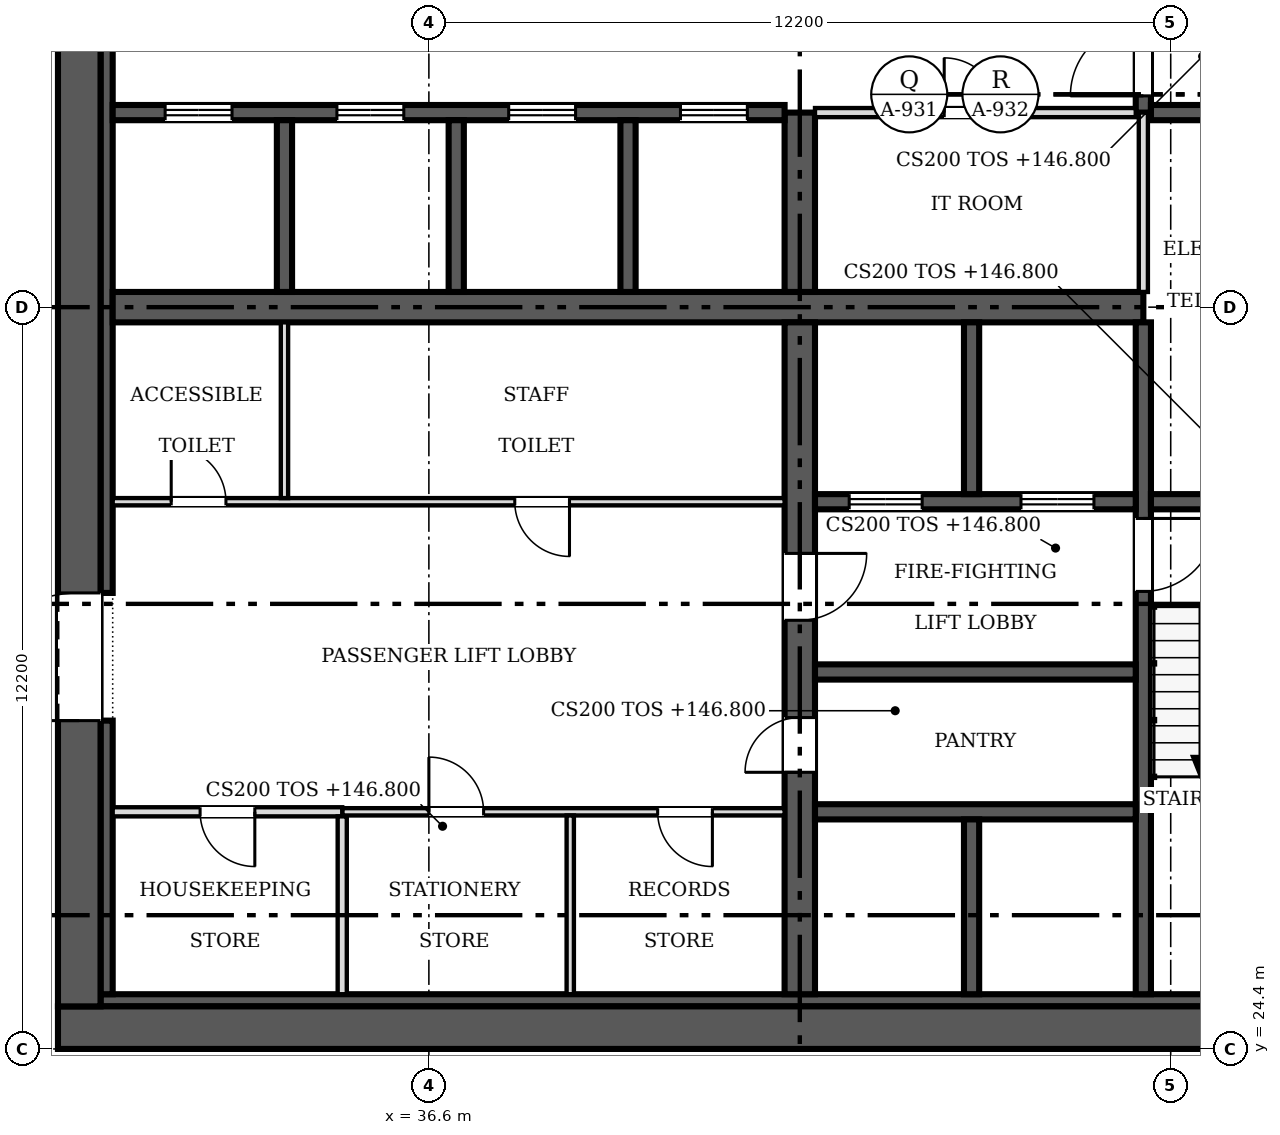
"""IFC4 building model, lengths in metres.
Left out: names, types, materials, properties, quantities, classifications, styles, units other than length and angle.
Written with IfcOpenShell. Run it as: python <this file> out.ifc"""

import sys

from ifc_helpers import new_model, si_unit, direction, frame, frame_2d, origin, place, context, subcontext, project, spatial, rectangle, extrude, source, transform, mapped, element, fill, save


model = new_model("IFC4")
c1 = context("Model", 3, precision=1e-05, world=origin(), true_north=direction((0.0, 1.0)))
c2 = subcontext(c1, "Body", "Model", "MODEL_VIEW")
j1 = project(units=[si_unit("LENGTHUNIT", "METRE"), si_unit("PLANEANGLEUNIT", "RADIAN")], contexts=[c1])
p1 = place(None, origin())
s1 = spatial("IfcSite", under=j1, at=p1, CompositionType="ELEMENT")
p2 = place(p1, origin())
s2 = spatial("IfcBuilding", under=s1, at=p2, CompositionType="ELEMENT")
p3 = place(p2, frame((0.0, 0.0, 146.8)))
s3 = spatial("IfcBuildingStorey", under=s2, at=p3, CompositionType="ELEMENT", Elevation=146.8)
p4 = place(p3, frame((54.9, 24.75, 0.0), z_axis=(0.0, 0.0, 1.0), x_axis=(-1.0, 0.0, 0.0)))
e1 = element("IfcWall", 1, at=p4, inside=s3, PredefinedType="SHEAR", context=c2, shape_type="SweptSolid", body=[
    extrude(rectangle(XDim=24.4, YDim=0.7, at=frame_2d((12.2, 0.0))), origin(), (0.0, 0.0, 1.0), 3.8),
])
m1 = source(origin(), c2, "Body", "SweptSolid", [
    extrude(rectangle(XDim=1.2, YDim=2.1, at=frame_2d((0.6, 1.05))), frame((0.0, 0.36, 0.0), z_axis=(0.0, -1.0, 0.0), x_axis=(1.0, 0.0, 0.0)), (0.0, 0.0, 1.0), 0.72),
])
p5 = place(p4, frame((1.5, 0.0, 0.0)))
e2 = element("IfcOpeningElement", 2, at=p5, cuts=e1, PredefinedType="OPENING", context=c2, shape_type="MappedRepresentation", body=[
    mapped(m1, transform((0.0, 0.0, 0.0), scale=1.0)),
])
p6 = place(p3, frame((30.85, 25.1, 0.0), z_axis=(0.0, 0.0, 1.0), x_axis=(0.0, 1.0, 0.0)))
e3 = element("IfcWall", 3, at=p6, inside=s3, PredefinedType="SHEAR", context=c2, shape_type="SweptSolid", body=[
    extrude(rectangle(XDim=23.0, YDim=0.7, at=frame_2d((11.5, 0.0))), origin(), (0.0, 0.0, 1.0), 3.8),
])
m2 = source(origin(), c2, "Body", "SweptSolid", [
    extrude(rectangle(XDim=2.1, YDim=2.4, at=frame_2d((1.05, 1.2))), frame((0.0, 0.36, 0.0), z_axis=(0.0, -1.0, 0.0), x_axis=(1.0, 0.0, 0.0)), (0.0, 0.0, 1.0), 0.72),
])
p7 = place(p6, frame((4.7, 0.0, 0.0)))
e4 = element("IfcOpeningElement", 4, at=p7, cuts=e3, PredefinedType="OPENING", context=c2, shape_type="MappedRepresentation", body=[
    mapped(m2, transform((0.0, 0.0, 0.0), scale=1.0)),
])
p8 = place(p6, frame((16.2, 0.0, 0.0)))
e5 = element("IfcOpeningElement", 5, at=p8, cuts=e3, PredefinedType="OPENING", context=c2, shape_type="MappedRepresentation", body=[
    mapped(m2, transform((0.0, 0.0, 0.0), scale=1.0)),
])
p9 = place(p3, frame((31.2, 25.2, 0.0), z_axis=(0.0, 0.0, 1.0), x_axis=(1.0, 0.0, 0.0)))
e6 = element("IfcWall", 6, at=p9, inside=s3, PredefinedType="SOLIDWALL", context=c2, shape_type="SweptSolid", body=[
    extrude(rectangle(XDim=21.0, YDim=0.2, at=frame_2d((10.5, 0.0))), origin(), (0.0, 0.0, 1.0), 3.8),
])
p10 = place(p3, frame((31.3, 25.3, 0.0), z_axis=(0.0, 0.0, 1.0), x_axis=(0.0, 1.0, 0.0)))
e7 = element("IfcWall", 7, at=p10, inside=s3, PredefinedType="SOLIDWALL", context=c2, shape_type="SweptSolid", body=[
    extrude(rectangle(XDim=4.5, YDim=0.2, at=frame_2d((2.25, 0.0))), origin(), (0.0, 0.0, 1.0), 3.8),
])
p11 = place(p3, frame((31.3, 31.9, 0.0), z_axis=(0.0, 0.0, 1.0), x_axis=(0.0, 1.0, 0.0)))
e8 = element("IfcWall", 8, at=p11, inside=s3, PredefinedType="SOLIDWALL", context=c2, shape_type="SweptSolid", body=[
    extrude(rectangle(XDim=9.4, YDim=0.2, at=frame_2d((4.7, 0.0))), origin(), (0.0, 0.0, 1.0), 3.8),
])
p12 = place(p3, frame((31.4, 36.6, 0.0), z_axis=(0.0, 0.0, 1.0), x_axis=(1.0, 0.0, 0.0)))
e9 = element("IfcWall", 9, at=p12, inside=s3, PredefinedType="SHEAR", context=c2, shape_type="SweptSolid", body=[
    extrude(rectangle(XDim=16.95, YDim=0.5, at=frame_2d((8.475, 0.0))), origin(), (0.0, 0.0, 1.0), 3.8),
])
p13 = place(p3, frame((42.7, 36.35, 0.0), z_axis=(0.0, 0.0, 1.0), x_axis=(0.0, -1.0, 0.0)))
e10 = element("IfcWall", 10, at=p13, inside=s3, PredefinedType="SHEAR", context=c2, shape_type="SweptSolid", body=[
    extrude(rectangle(XDim=11.05, YDim=0.5, at=frame_2d((5.525, 0.0))), origin(), (0.0, 0.0, 1.0), 3.8),
])
m3 = source(origin(), c2, "Body", "SweptSolid", [
    extrude(rectangle(XDim=0.9, YDim=2.1, at=frame_2d((0.45, 1.05))), frame((0.0, 0.26, 0.0), z_axis=(0.0, -1.0, 0.0), x_axis=(1.0, 0.0, 0.0)), (0.0, 0.0, 1.0), 0.52),
])
p14 = place(p13, frame((6.5, 0.0, 0.0)))
e11 = element("IfcOpeningElement", 11, at=p14, cuts=e10, PredefinedType="OPENING", context=c2, shape_type="MappedRepresentation", body=[
    mapped(m3, transform((0.0, 0.0, 0.0), scale=1.0)),
])
m4 = source(origin(), c2, "Body", "SweptSolid", [
    extrude(rectangle(XDim=1.1, YDim=2.1, at=frame_2d((0.55, 1.05))), frame((0.0, 0.26, 0.0), z_axis=(0.0, -1.0, 0.0), x_axis=(1.0, 0.0, 0.0)), (0.0, 0.0, 1.0), 0.52),
])
p15 = place(p13, frame((3.8, 0.0, 0.0)))
e12 = element("IfcOpeningElement", 12, at=p15, cuts=e10, PredefinedType="OPENING", context=c2, shape_type="MappedRepresentation", body=[
    mapped(m4, transform((0.0, 0.0, 0.0), scale=1.0)),
])
p16 = place(p3, frame((42.7, 36.85, 0.0), z_axis=(0.0, 0.0, 1.0), x_axis=(0.0, 1.0, 0.0)))
e13 = element("IfcWall", 13, at=p16, inside=s3, PredefinedType="SHEAR", context=c2, shape_type="SweptSolid", body=[
    extrude(rectangle(XDim=2.95, YDim=0.5, at=frame_2d((1.475, 0.0))), origin(), (0.0, 0.0, 1.0), 3.8),
])
p17 = place(p3, frame((31.4, 39.8, 0.0), z_axis=(0.0, 0.0, 1.0), x_axis=(1.0, 0.0, 0.0)))
e14 = element("IfcWall", 14, at=p17, inside=s3, PredefinedType="SOLIDWALL", context=c2, shape_type="SweptSolid", body=[
    extrude(rectangle(XDim=11.05, YDim=0.25, at=frame_2d((5.525, 0.0))), origin(), (0.0, 0.0, 1.0), 3.8),
])
m5 = source(origin(), c2, "Body", "SweptSolid", [
    extrude(rectangle(XDim=1.1, YDim=2.1, at=frame_2d((0.55, 1.05))), frame((0.0, 0.135, 0.0), z_axis=(0.0, -1.0, 0.0), x_axis=(1.0, 0.0, 0.0)), (0.0, 0.0, 1.0), 0.27),
])
p18 = place(p17, frame((0.863, 0.0, 0.0)))
e15 = element("IfcOpeningElement", 15, at=p18, cuts=e14, PredefinedType="OPENING", context=c2, shape_type="MappedRepresentation", body=[
    mapped(m5, transform((0.0, 0.0, 0.0), scale=1.0)),
])
p19 = place(p17, frame((3.688, 0.0, 0.0)))
e16 = element("IfcOpeningElement", 16, at=p19, cuts=e14, PredefinedType="OPENING", context=c2, shape_type="MappedRepresentation", body=[
    mapped(m5, transform((0.0, 0.0, 0.0), scale=1.0)),
])
p20 = place(p17, frame((6.512, 0.0, 0.0)))
e17 = element("IfcOpeningElement", 17, at=p20, cuts=e14, PredefinedType="OPENING", context=c2, shape_type="MappedRepresentation", body=[
    mapped(m5, transform((0.0, 0.0, 0.0), scale=1.0)),
])
p21 = place(p17, frame((9.337, 0.0, 0.0)))
e18 = element("IfcOpeningElement", 18, at=p21, cuts=e14, PredefinedType="OPENING", context=c2, shape_type="MappedRepresentation", body=[
    mapped(m5, transform((0.0, 0.0, 0.0), scale=1.0)),
])
p22 = place(p3, frame((48.35, 36.35, 0.0), z_axis=(0.0, 0.0, 1.0), x_axis=(0.0, -1.0, 0.0)))
e19 = element("IfcWall", 19, at=p22, inside=s3, PredefinedType="SOLIDWALL", context=c2, shape_type="SweptSolid", body=[
    extrude(rectangle(XDim=11.05, YDim=0.25, at=frame_2d((5.525, 0.0))), origin(), (0.0, 0.0, 1.0), 3.8),
])
m6 = source(origin(), c2, "Body", "SweptSolid", [
    extrude(rectangle(XDim=1.2, YDim=2.1, at=frame_2d((0.6, 1.05))), frame((0.0, 0.135, 0.0), z_axis=(0.0, -1.0, 0.0), x_axis=(1.0, 0.0, 0.0)), (0.0, 0.0, 1.0), 0.27),
])
p23 = place(p22, frame((3.225, 0.0, 0.0)))
e20 = element("IfcOpeningElement", 20, at=p23, cuts=e19, PredefinedType="OPENING", context=c2, shape_type="MappedRepresentation", body=[
    mapped(m6, transform((0.0, 0.0, 0.0), scale=1.0)),
])
p24 = place(p3, frame((48.225, 33.4, 0.0), z_axis=(0.0, 0.0, 1.0), x_axis=(-1.0, 0.0, 0.0)))
e21 = element("IfcWall", 21, at=p24, inside=s3, PredefinedType="SOLIDWALL", context=c2, shape_type="SweptSolid", body=[
    extrude(rectangle(XDim=5.275, YDim=0.25, at=frame_2d((2.638, 0.0))), origin(), (0.0, 0.0, 1.0), 3.8),
])
p25 = place(p24, frame((3.512, 0.0, 0.0)))
e22 = element("IfcOpeningElement", 22, at=p25, cuts=e21, PredefinedType="OPENING", context=c2, shape_type="MappedRepresentation", body=[
    mapped(m6, transform((0.0, 0.0, 0.0), scale=1.0)),
])
p26 = place(p24, frame((0.688, 0.0, 0.0)))
e23 = element("IfcOpeningElement", 23, at=p26, cuts=e21, PredefinedType="OPENING", context=c2, shape_type="MappedRepresentation", body=[
    mapped(m6, transform((0.0, 0.0, 0.0), scale=1.0)),
])
p27 = place(p3, frame((48.475, 33.4, 0.0), z_axis=(0.0, 0.0, 1.0), x_axis=(1.0, 0.0, 0.0)))
e24 = element("IfcWall", 24, at=p27, inside=s3, PredefinedType="SOLIDWALL", context=c2, shape_type="SweptSolid", body=[
    extrude(rectangle(XDim=3.525, YDim=0.25, at=frame_2d((1.762, 0.0))), origin(), (0.0, 0.0, 1.0), 3.8),
])
p28 = place(p3, frame((48.35, 47.9, 0.0), z_axis=(0.0, 0.0, 1.0), x_axis=(0.0, -1.0, 0.0)))
e25 = element("IfcWall", 25, at=p28, inside=s3, PredefinedType="SOLIDWALL", context=c2, shape_type="SweptSolid", body=[
    extrude(rectangle(XDim=8.1, YDim=0.25, at=frame_2d((4.05, 0.0))), origin(), (0.0, 0.0, 1.0), 3.8),
])
p29 = place(p28, frame((6.625, 0.0, 0.0)))
e26 = element("IfcOpeningElement", 26, at=p29, cuts=e25, PredefinedType="OPENING", context=c2, shape_type="MappedRepresentation", body=[
    mapped(m6, transform((0.0, 0.0, 0.0), scale=1.0)),
])
for number, where, z_axis, x_axis in (
    (27, (42.95, 28.3, 0.0), (0.0, 0.0, 1.0), (1.0, 0.0, 0.0)),
    (28, (42.95, 30.6, 0.0), (0.0, 0.0, 1.0), (1.0, 0.0, 0.0)),
):
    element("IfcWall", number, at=place(p3, frame(where, z_axis=z_axis, x_axis=x_axis)), inside=s3, PredefinedType="SOLIDWALL", context=c2, shape_type="SweptSolid", body=[
        extrude(rectangle(XDim=5.275, YDim=0.25, at=frame_2d((2.638, 0.0))), origin(), (0.0, 0.0, 1.0), 3.8),
    ])
p30 = place(p3, frame((48.475, 39.8, 0.0), z_axis=(0.0, 0.0, 1.0), x_axis=(1.0, 0.0, 0.0)))
e29 = element("IfcWall", 29, at=p30, inside=s3, PredefinedType="SOLIDWALL", context=c2, shape_type="SweptSolid", body=[
    extrude(rectangle(XDim=3.4, YDim=0.25, at=frame_2d((1.7, 0.0))), origin(), (0.0, 0.0, 1.0), 3.8),
])
for number, where, z_axis, x_axis in (
    (30, (34.225, 36.85, 0.0), (0.0, 0.0, 1.0), (0.0, 1.0, 0.0)),
    (31, (37.05, 36.85, 0.0), (0.0, 0.0, 1.0), (0.0, 1.0, 0.0)),
    (32, (39.875, 36.85, 0.0), (0.0, 0.0, 1.0), (0.0, 1.0, 0.0)),
):
    element("IfcWall", number, at=place(p3, frame(where, z_axis=z_axis, x_axis=x_axis)), inside=s3, PredefinedType="SOLIDWALL", context=c2, shape_type="SweptSolid", body=[
        extrude(rectangle(XDim=2.825, YDim=0.25, at=frame_2d((1.413, 0.0))), origin(), (0.0, 0.0, 1.0), 3.8),
    ])
p31 = place(p3, frame((45.525, 33.525, 0.0), z_axis=(0.0, 0.0, 1.0), x_axis=(0.0, 1.0, 0.0)))
e33 = element("IfcWall", 33, at=p31, inside=s3, PredefinedType="SOLIDWALL", context=c2, shape_type="SweptSolid", body=[
    extrude(rectangle(XDim=2.825, YDim=0.25, at=frame_2d((1.413, 0.0))), origin(), (0.0, 0.0, 1.0), 3.8),
])
p32 = place(p3, frame((45.525, 25.3, 0.0), z_axis=(0.0, 0.0, 1.0), x_axis=(0.0, 1.0, 0.0)))
e34 = element("IfcWall", 34, at=p32, inside=s3, PredefinedType="SOLIDWALL", context=c2, shape_type="SweptSolid", body=[
    extrude(rectangle(XDim=2.875, YDim=0.25, at=frame_2d((1.438, 0.0))), origin(), (0.0, 0.0, 1.0), 3.8),
])
p33 = place(p3, frame((31.4, 33.4, 0.0), z_axis=(0.0, 0.0, 1.0), x_axis=(1.0, 0.0, 0.0)))
e35 = element("IfcWall", 35, at=p33, inside=s3, PredefinedType="PARTITIONING", context=c2, shape_type="SweptSolid", body=[
    extrude(rectangle(XDim=11.05, YDim=0.12, at=frame_2d((5.525, 0.0))), origin(), (0.0, 0.0, 1.0), 3.5),
])
m7 = source(origin(), c2, "Body", "SweptSolid", [
    extrude(rectangle(XDim=0.9, YDim=2.1, at=frame_2d((0.45, 1.05))), frame((0.0, 0.07, 0.0), z_axis=(0.0, -1.0, 0.0), x_axis=(1.0, 0.0, 0.0)), (0.0, 0.0, 1.0), 0.14),
])
p34 = place(p33, frame((0.962, 0.0, 0.0)))
e36 = element("IfcOpeningElement", 36, at=p34, cuts=e35, PredefinedType="OPENING", context=c2, shape_type="MappedRepresentation", body=[
    mapped(m7, transform((0.0, 0.0, 0.0), scale=1.0)),
])
p35 = place(p33, frame((6.613, 0.0, 0.0)))
e37 = element("IfcOpeningElement", 37, at=p35, cuts=e35, PredefinedType="OPENING", context=c2, shape_type="MappedRepresentation", body=[
    mapped(m7, transform((0.0, 0.0, 0.0), scale=1.0)),
])
p36 = place(p3, frame((42.45, 28.3, 0.0), z_axis=(0.0, 0.0, 1.0), x_axis=(-1.0, 0.0, 0.0)))
e38 = element("IfcWall", 38, at=p36, inside=s3, PredefinedType="PARTITIONING", context=c2, shape_type="SweptSolid", body=[
    extrude(rectangle(XDim=7.275, YDim=0.12, at=frame_2d((3.637, 0.0))), origin(), (0.0, 0.0, 1.0), 3.5),
])
p37 = place(p36, frame((4.95, 0.0, 0.0)))
e39 = element("IfcOpeningElement", 39, at=p37, cuts=e38, PredefinedType="OPENING", context=c2, shape_type="MappedRepresentation", body=[
    mapped(m7, transform((0.0, 0.0, 0.0), scale=1.0)),
])
p38 = place(p36, frame((1.188, 0.0, 0.0)))
e40 = element("IfcOpeningElement", 40, at=p38, cuts=e38, PredefinedType="OPENING", context=c2, shape_type="MappedRepresentation", body=[
    mapped(m7, transform((0.0, 0.0, 0.0), scale=1.0)),
])
p39 = place(p3, frame((48.225, 39.8, 0.0), z_axis=(0.0, 0.0, 1.0), x_axis=(-1.0, 0.0, 0.0)))
e41 = element("IfcWall", 41, at=p39, inside=s3, PredefinedType="PARTITIONING", context=c2, shape_type="SweptSolid", body=[
    extrude(rectangle(XDim=5.275, YDim=0.15, at=frame_2d((2.638, 0.0))), origin(), (0.0, 0.0, 1.0), 3.5),
])
m8 = source(origin(), c2, "Body", "SweptSolid", [
    extrude(rectangle(XDim=0.9, YDim=2.1, at=frame_2d((0.45, 1.05))), frame((0.0, 0.085, 0.0), z_axis=(0.0, -1.0, 0.0), x_axis=(1.0, 0.0, 0.0)), (0.0, 0.0, 1.0), 0.17),
])
p40 = place(p39, frame((2.25, 0.0, 0.0)))
e42 = element("IfcOpeningElement", 42, at=p40, cuts=e41, PredefinedType="OPENING", context=c2, shape_type="MappedRepresentation", body=[
    mapped(m8, transform((0.0, 0.0, 0.0), scale=1.0)),
])
p41 = place(p3, frame((35.175, 28.3, 0.0), z_axis=(0.0, 0.0, 1.0), x_axis=(-1.0, 0.0, 0.0)))
e43 = element("IfcWall", 43, at=p41, inside=s3, PredefinedType="PARTITIONING", context=c2, shape_type="SweptSolid", body=[
    extrude(rectangle(XDim=3.775, YDim=0.15, at=frame_2d((1.888, 0.0))), origin(), (0.0, 0.0, 1.0), 3.5),
])
p42 = place(p41, frame((1.438, 0.0, 0.0)))
e44 = element("IfcOpeningElement", 44, at=p42, cuts=e43, PredefinedType="OPENING", context=c2, shape_type="MappedRepresentation", body=[
    mapped(m8, transform((0.0, 0.0, 0.0), scale=1.0)),
])
p43 = place(p3, frame((48.35, 36.85, 0.0), z_axis=(0.0, 0.0, 1.0), x_axis=(0.0, 1.0, 0.0)))
e45 = element("IfcWall", 45, at=p43, inside=s3, PredefinedType="PARTITIONING", context=c2, shape_type="SweptSolid", body=[
    extrude(rectangle(XDim=2.95, YDim=0.15, at=frame_2d((1.475, 0.0))), origin(), (0.0, 0.0, 1.0), 3.5),
])
p44 = place(p3, frame((34.225, 33.46, 0.0), z_axis=(0.0, 0.0, 1.0), x_axis=(0.0, 1.0, 0.0)))
e46 = element("IfcWall", 46, at=p44, inside=s3, PredefinedType="PARTITIONING", context=c2, shape_type="SweptSolid", body=[
    extrude(rectangle(XDim=2.89, YDim=0.12, at=frame_2d((1.445, 0.0))), origin(), (0.0, 0.0, 1.0), 3.5),
])
p45 = place(p3, frame((35.175, 25.3, 0.0), z_axis=(0.0, 0.0, 1.0), x_axis=(0.0, 1.0, 0.0)))
e47 = element("IfcWall", 47, at=p45, inside=s3, PredefinedType="PARTITIONING", context=c2, shape_type="SweptSolid", body=[
    extrude(rectangle(XDim=2.925, YDim=0.15, at=frame_2d((1.462, 0.0))), origin(), (0.0, 0.0, 1.0), 3.5),
])
p46 = place(p3, frame((38.925, 25.3, 0.0), z_axis=(0.0, 0.0, 1.0), x_axis=(0.0, 1.0, 0.0)))
e48 = element("IfcWall", 48, at=p46, inside=s3, PredefinedType="PARTITIONING", context=c2, shape_type="SweptSolid", body=[
    extrude(rectangle(XDim=2.94, YDim=0.12, at=frame_2d((1.47, 0.0))), origin(), (0.0, 0.0, 1.0), 3.5),
])
m9 = source(origin(), c2, "Body", "SweptSolid", [
    extrude(rectangle(XDim=2.1, YDim=2.4, at=frame_2d((1.05, 1.2))), frame((0.0, 0.025, 0.0), z_axis=(0.0, -1.0, 0.0), x_axis=(1.0, 0.0, 0.0)), (0.0, 0.0, 1.0), 0.05),
])
p47 = place(p7, origin())
e49 = element("IfcDoor", 49, at=p47, inside=s3, OperationType="DOUBLE_DOOR_SINGLE_SWING", PredefinedType="DOOR", context=c2, shape_type="MappedRepresentation", body=[
    mapped(m9, transform((0.0, 0.0, 0.0), scale=1.0)),
])
fill(e4, e49)
m10 = source(origin(), c2, "Body", "SweptSolid", [
    extrude(rectangle(XDim=0.9, YDim=2.1, at=frame_2d((0.45, 1.05))), frame((0.0, 0.025, 0.0), z_axis=(0.0, -1.0, 0.0), x_axis=(1.0, 0.0, 0.0)), (0.0, 0.0, 1.0), 0.05),
])
p48 = place(p14, origin())
e50 = element("IfcDoor", 50, at=p48, inside=s3, OperationType="SINGLE_SWING_RIGHT", PredefinedType="DOOR", context=c2, shape_type="MappedRepresentation", body=[
    mapped(m10, transform((0.0, 0.0, 0.0), scale=1.0)),
])
fill(e11, e50)
m11 = source(origin(), c2, "Body", "SweptSolid", [
    extrude(rectangle(XDim=1.1, YDim=2.1, at=frame_2d((0.55, 1.05))), frame((0.0, 0.025, 0.0), z_axis=(0.0, -1.0, 0.0), x_axis=(1.0, 0.0, 0.0)), (0.0, 0.0, 1.0), 0.05),
])
p49 = place(p15, origin())
e51 = element("IfcDoor", 51, at=p49, inside=s3, OperationType="SINGLE_SWING_LEFT", PredefinedType="DOOR", context=c2, shape_type="MappedRepresentation", body=[
    mapped(m11, transform((0.0, 0.0, 0.0), scale=1.0)),
])
fill(e12, e51)
p50 = place(p18, origin())
e52 = element("IfcDoor", 52, at=p50, inside=s3, OperationType="DOUBLE_DOOR_SLIDING", PredefinedType="DOOR", context=c2, shape_type="MappedRepresentation", body=[
    mapped(m11, transform((0.0, 0.0, 0.0), scale=1.0)),
])
fill(e15, e52)
p51 = place(p19, origin())
e53 = element("IfcDoor", 53, at=p51, inside=s3, OperationType="DOUBLE_DOOR_SLIDING", PredefinedType="DOOR", context=c2, shape_type="MappedRepresentation", body=[
    mapped(m11, transform((0.0, 0.0, 0.0), scale=1.0)),
])
fill(e16, e53)
p52 = place(p20, origin())
e54 = element("IfcDoor", 54, at=p52, inside=s3, OperationType="DOUBLE_DOOR_SLIDING", PredefinedType="DOOR", context=c2, shape_type="MappedRepresentation", body=[
    mapped(m11, transform((0.0, 0.0, 0.0), scale=1.0)),
])
fill(e17, e54)
p53 = place(p21, origin())
e55 = element("IfcDoor", 55, at=p53, inside=s3, OperationType="DOUBLE_DOOR_SLIDING", PredefinedType="DOOR", context=c2, shape_type="MappedRepresentation", body=[
    mapped(m11, transform((0.0, 0.0, 0.0), scale=1.0)),
])
fill(e18, e55)
m12 = source(origin(), c2, "Body", "SweptSolid", [
    extrude(rectangle(XDim=1.2, YDim=2.1, at=frame_2d((0.6, 1.05))), frame((0.0, 0.025, 0.0), z_axis=(0.0, -1.0, 0.0), x_axis=(1.0, 0.0, 0.0)), (0.0, 0.0, 1.0), 0.05),
])
p54 = place(p23, origin())
e56 = element("IfcDoor", 56, at=p54, inside=s3, OperationType="SINGLE_SWING_LEFT", PredefinedType="DOOR", context=c2, shape_type="MappedRepresentation", body=[
    mapped(m12, transform((0.0, 0.0, 0.0), scale=1.0)),
])
fill(e20, e56)
p55 = place(p25, origin())
e57 = element("IfcDoor", 57, at=p55, inside=s3, OperationType="DOUBLE_DOOR_SLIDING", PredefinedType="DOOR", context=c2, shape_type="MappedRepresentation", body=[
    mapped(m12, transform((0.0, 0.0, 0.0), scale=1.0)),
])
fill(e22, e57)
p56 = place(p26, origin())
e58 = element("IfcDoor", 58, at=p56, inside=s3, OperationType="DOUBLE_DOOR_SLIDING", PredefinedType="DOOR", context=c2, shape_type="MappedRepresentation", body=[
    mapped(m12, transform((0.0, 0.0, 0.0), scale=1.0)),
])
fill(e23, e58)
p57 = place(p29, origin())
e59 = element("IfcDoor", 59, at=p57, inside=s3, OperationType="SINGLE_SWING_RIGHT", PredefinedType="DOOR", context=c2, shape_type="MappedRepresentation", body=[
    mapped(m12, transform((0.0, 0.0, 0.0), scale=1.0)),
])
fill(e26, e59)
p58 = place(p34, origin())
e60 = element("IfcDoor", 60, at=p58, inside=s3, OperationType="SINGLE_SWING_LEFT", PredefinedType="DOOR", context=c2, shape_type="MappedRepresentation", body=[
    mapped(m10, transform((0.0, 0.0, 0.0), scale=1.0)),
])
fill(e36, e60)
p59 = place(p35, origin())
e61 = element("IfcDoor", 61, at=p59, inside=s3, OperationType="SINGLE_SWING_RIGHT", PredefinedType="DOOR", context=c2, shape_type="MappedRepresentation", body=[
    mapped(m10, transform((0.0, 0.0, 0.0), scale=1.0)),
])
fill(e37, e61)
p60 = place(p37, origin())
e62 = element("IfcDoor", 62, at=p60, inside=s3, OperationType="SINGLE_SWING_RIGHT", PredefinedType="DOOR", context=c2, shape_type="MappedRepresentation", body=[
    mapped(m10, transform((0.0, 0.0, 0.0), scale=1.0)),
])
fill(e39, e62)
p61 = place(p38, origin())
e63 = element("IfcDoor", 63, at=p61, inside=s3, OperationType="SINGLE_SWING_LEFT", PredefinedType="DOOR", context=c2, shape_type="MappedRepresentation", body=[
    mapped(m10, transform((0.0, 0.0, 0.0), scale=1.0)),
])
fill(e40, e63)
p62 = place(p40, origin())
e64 = element("IfcDoor", 64, at=p62, inside=s3, OperationType="SINGLE_SWING_RIGHT", PredefinedType="DOOR", context=c2, shape_type="MappedRepresentation", body=[
    mapped(m10, transform((0.0, 0.0, 0.0), scale=1.0)),
])
fill(e42, e64)
p63 = place(p42, origin())
e65 = element("IfcDoor", 65, at=p63, inside=s3, OperationType="SINGLE_SWING_LEFT", PredefinedType="DOOR", context=c2, shape_type="MappedRepresentation", body=[
    mapped(m10, transform((0.0, 0.0, 0.0), scale=1.0)),
])
fill(e44, e65)
save(model, sys.argv[1])
